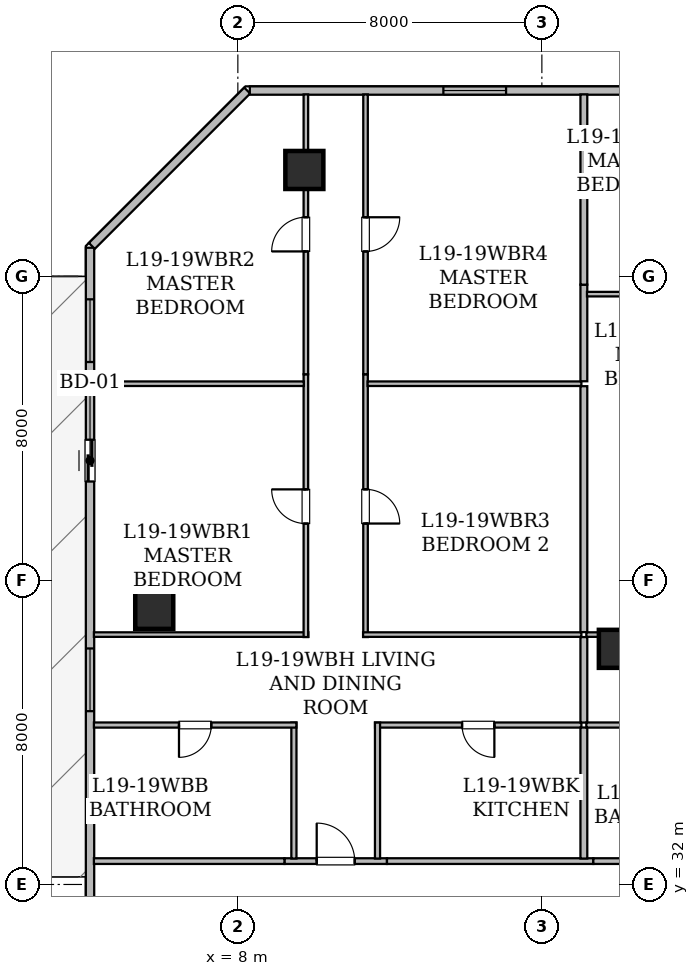
"""IFC4 building model, lengths in metres.
Left out: names, types, materials, properties, quantities, classifications, styles, units other than length and angle.
Written with IfcOpenShell. Run it as: python <this file> out.ifc"""

import sys

from ifc_helpers import new_model, si_unit, direction, frame, frame_2d, origin, origin_2d, place, context, subcontext, project, spatial, rectangle, hollow_rectangle, extrude, element, fill, save


model = new_model("IFC4")
c1 = context("Model", 3, precision=1e-05, world=origin(), true_north=direction((0.0, 1.0)))
c2 = subcontext(c1, "Body", "Model", "MODEL_VIEW")
j1 = project(units=[si_unit("LENGTHUNIT", "METRE"), si_unit("PLANEANGLEUNIT", "RADIAN")], contexts=[c1])
p1 = place(None, origin())
s1 = spatial("IfcSite", under=j1, at=p1, CompositionType="ELEMENT")
p2 = place(p1, origin())
s2 = spatial("IfcBuilding", under=s1, at=p2, CompositionType="ELEMENT")
p3 = place(p2, frame((0.0, 0.0, 77.1)))
s3 = spatial("IfcBuildingStorey", under=s2, at=p3, CompositionType="ELEMENT", Elevation=77.1)
for number, where, z_axis, x_axis in (
    (1, (9.75, 50.8, 0.0), (0.0, 0.0, 1.0), (1.0, 0.0, 0.0)),
    (2, (5.8, 39.225, 0.0), (0.0, 0.0, 1.0), (1.0, 0.0, 0.0)),
    (3, (18.0, 38.2, 0.0), (0.0, 0.0, 1.0), (1.0, 0.0, 0.0)),
):
    element("IfcColumn", number, at=place(p3, frame(where, z_axis=z_axis, x_axis=x_axis)), inside=s3, PredefinedType="COLUMN", context=c2, shape_type="SweptSolid", body=[
        extrude(hollow_rectangle(XDim=1.0, YDim=1.0, WallThickness=0.05, at=origin_2d()), origin(), (0.0, 0.0, 1.0), 3.65),
    ])
p4 = place(p3, frame((4.11, 31.295, 0.0), z_axis=(0.0, 0.0, 1.0), x_axis=(0.0, 1.0, 0.0)))
e4 = element("IfcWall", 4, at=p4, inside=s3, PredefinedType="STANDARD", context=c2, shape_type="SweptSolid", body=[
    extrude(rectangle(XDim=17.459, YDim=0.22, at=frame_2d((8.729, 0.0))), origin(), (0.0, 0.0, 1.0), 3.43),
])
p5 = place(p4, frame((11.308, 0.0, 0.0)))
e5 = element("IfcOpeningElement", 5, at=p5, cuts=e4, PredefinedType="OPENING", context=c2, shape_type="SweptSolid", body=[
    extrude(rectangle(XDim=1.1, YDim=2.2, at=frame_2d((0.55, 1.1))), frame((0.0, 0.12, 0.0), z_axis=(0.0, -1.0, 0.0), x_axis=(1.0, 0.0, 0.0)), (0.0, 0.0, 1.0), 0.24),
])
p6 = place(p4, frame((5.265, 0.0, 0.85)))
e6 = element("IfcOpeningElement", 6, at=p6, cuts=e4, PredefinedType="OPENING", context=c2, shape_type="SweptSolid", body=[
    extrude(rectangle(XDim=1.65, YDim=1.55, at=frame_2d((0.825, 0.775))), frame((0.0, 0.12, 0.0), z_axis=(0.0, -1.0, 0.0), x_axis=(1.0, 0.0, 0.0)), (0.0, 0.0, 1.0), 0.24),
])
p7 = place(p4, frame((14.452, 0.0, 0.85)))
e7 = element("IfcOpeningElement", 7, at=p7, cuts=e4, PredefinedType="OPENING", context=c2, shape_type="SweptSolid", body=[
    extrude(rectangle(XDim=1.65, YDim=1.55, at=frame_2d((0.825, 0.775))), frame((0.0, 0.12, 0.0), z_axis=(0.0, -1.0, 0.0), x_axis=(1.0, 0.0, 0.0)), (0.0, 0.0, 1.0), 0.24),
])
p8 = place(p3, frame((4.158, 48.802, 0.0), z_axis=(0.0, 0.0, 1.0), x_axis=(0.70712789547, 0.707085666273, 0.0)))
e8 = element("IfcWall", 8, at=p8, inside=s3, PredefinedType="STANDARD", context=c2, shape_type="SweptSolid", body=[
    extrude(rectangle(XDim=5.781, YDim=0.22, at=frame_2d((2.891, 0.0))), origin(), (0.0, 0.0, 1.0), 3.43),
])
p9 = place(p3, frame((8.315, 52.89, 0.0), z_axis=(0.0, 0.0, 1.0), x_axis=(1.0, 0.0, 0.0)))
e9 = element("IfcWall", 9, at=p9, inside=s3, PredefinedType="STANDARD", context=c2, shape_type="SweptSolid", body=[
    extrude(rectangle(XDim=37.439, YDim=0.22, at=frame_2d((18.719, 0.0))), origin(), (0.0, 0.0, 1.0), 3.43),
])
p10 = place(p9, frame((5.093, 0.0, 0.85)))
e10 = element("IfcOpeningElement", 10, at=p10, cuts=e9, PredefinedType="OPENING", context=c2, shape_type="SweptSolid", body=[
    extrude(rectangle(XDim=1.65, YDim=1.55, at=frame_2d((0.825, 0.775))), frame((0.0, 0.12, 0.0), z_axis=(0.0, -1.0, 0.0), x_axis=(1.0, 0.0, 0.0)), (0.0, 0.0, 1.0), 0.24),
])
p11 = place(p9, frame((13.055, 0.0, 0.8)))
e11 = element("IfcOpeningElement", 11, at=p11, cuts=e9, PredefinedType="OPENING", context=c2, shape_type="SweptSolid", body=[
    extrude(rectangle(XDim=1.2, YDim=1.5, at=frame_2d((0.6, 0.75))), frame((0.0, 0.12, 0.0), z_axis=(0.0, -1.0, 0.0), x_axis=(1.0, 0.0, 0.0)), (0.0, 0.0, 1.0), 0.24),
])
p12 = place(p9, frame((10.005, 0.0, 0.85)))
e12 = element("IfcOpeningElement", 12, at=p12, cuts=e9, PredefinedType="OPENING", context=c2, shape_type="SweptSolid", body=[
    extrude(rectangle(XDim=1.65, YDim=1.55, at=frame_2d((0.825, 0.775))), frame((0.0, 0.12, 0.0), z_axis=(0.0, -1.0, 0.0), x_axis=(1.0, 0.0, 0.0)), (0.0, 0.0, 1.0), 0.24),
])
p13 = place(p9, frame((15.655, 0.0, 0.85)))
e13 = element("IfcOpeningElement", 13, at=p13, cuts=e9, PredefinedType="OPENING", context=c2, shape_type="SweptSolid", body=[
    extrude(rectangle(XDim=1.65, YDim=1.55, at=frame_2d((0.825, 0.775))), frame((0.0, 0.12, 0.0), z_axis=(0.0, -1.0, 0.0), x_axis=(1.0, 0.0, 0.0)), (0.0, 0.0, 1.0), 0.24),
])
p14 = place(p9, frame((25.185, 0.0, 0.8)))
e14 = element("IfcOpeningElement", 14, at=p14, cuts=e9, PredefinedType="OPENING", context=c2, shape_type="SweptSolid", body=[
    extrude(rectangle(XDim=1.2, YDim=1.5, at=frame_2d((0.6, 0.75))), frame((0.0, 0.12, 0.0), z_axis=(0.0, -1.0, 0.0), x_axis=(1.0, 0.0, 0.0)), (0.0, 0.0, 1.0), 0.24),
])
p15 = place(p9, frame((20.935, 0.0, 0.85)))
e15 = element("IfcOpeningElement", 15, at=p15, cuts=e9, PredefinedType="OPENING", context=c2, shape_type="SweptSolid", body=[
    extrude(rectangle(XDim=1.65, YDim=1.55, at=frame_2d((0.825, 0.775))), frame((0.0, 0.12, 0.0), z_axis=(0.0, -1.0, 0.0), x_axis=(1.0, 0.0, 0.0)), (0.0, 0.0, 1.0), 0.24),
])
p16 = place(p9, frame((28.985, 0.0, 0.85)))
e16 = element("IfcOpeningElement", 16, at=p16, cuts=e9, PredefinedType="OPENING", context=c2, shape_type="SweptSolid", body=[
    extrude(rectangle(XDim=1.65, YDim=1.55, at=frame_2d((0.825, 0.775))), frame((0.0, 0.12, 0.0), z_axis=(0.0, -1.0, 0.0), x_axis=(1.0, 0.0, 0.0)), (0.0, 0.0, 1.0), 0.24),
])
p17 = place(p9, frame((33.98, 0.0, 0.85)))
e17 = element("IfcOpeningElement", 17, at=p17, cuts=e9, PredefinedType="OPENING", context=c2, shape_type="SweptSolid", body=[
    extrude(rectangle(XDim=1.65, YDim=1.55, at=frame_2d((0.825, 0.775))), frame((0.0, 0.12, 0.0), z_axis=(0.0, -1.0, 0.0), x_axis=(1.0, 0.0, 0.0)), (0.0, 0.0, 1.0), 0.24),
])
p18 = place(p3, frame((9.226, 32.615, 0.0), z_axis=(0.0, 0.0, 1.0), x_axis=(1.0, 0.0, 0.0)))
e18 = element("IfcWall", 18, at=p18, inside=s3, PredefinedType="STANDARD", context=c2, shape_type="SweptSolid", body=[
    extrude(rectangle(XDim=2.698, YDim=0.15, at=frame_2d((1.349, 0.0))), origin(), (0.0, 0.0, 1.0), 3.43),
])
p19 = place(p18, frame((0.849, 0.0, 0.0)))
e19 = element("IfcOpeningElement", 19, at=p19, cuts=e18, PredefinedType="OPENING", context=c2, shape_type="SweptSolid", body=[
    extrude(rectangle(XDim=1.0, YDim=2.15, at=frame_2d((0.5, 1.075))), frame((0.0, 0.085, 0.0), z_axis=(0.0, -1.0, 0.0), x_axis=(1.0, 0.0, 0.0)), (0.0, 0.0, 1.0), 0.17),
])
p20 = place(p3, frame((4.212, 32.615, 0.0), z_axis=(0.0, 0.0, 1.0), x_axis=(1.0, 0.0, 0.0)))
e20 = element("IfcWall", 20, at=p20, inside=s3, PredefinedType="STANDARD", context=c2, shape_type="SweptSolid", body=[
    extrude(rectangle(XDim=5.014, YDim=0.15, at=frame_2d((2.507, 0.0))), origin(), (0.0, 0.0, 1.0), 2.803),
])
p21 = place(p3, frame((11.924, 32.615, 0.0), z_axis=(0.0, 0.0, 1.0), x_axis=(1.0, 0.0, 0.0)))
e21 = element("IfcWall", 21, at=p21, inside=s3, PredefinedType="STANDARD", context=c2, shape_type="SweptSolid", body=[
    extrude(rectangle(XDim=5.43, YDim=0.15, at=frame_2d((2.715, 0.0))), origin(), (0.0, 0.0, 1.0), 3.43),
])
p22 = place(p3, frame((17.354, 32.615, 0.0), z_axis=(0.0, 0.0, 1.0), x_axis=(1.0, 0.0, 0.0)))
e22 = element("IfcWall", 22, at=p22, inside=s3, PredefinedType="STANDARD", context=c2, shape_type="SweptSolid", body=[
    extrude(rectangle(XDim=3.267, YDim=0.15, at=frame_2d((1.634, 0.0))), origin(), (0.0, 0.0, 1.0), 2.647),
])
p23 = place(p3, frame((9.475, 32.682, 0.0), z_axis=(0.0, 0.0, 1.0), x_axis=(0.0, 1.0, 0.0)))
e23 = element("IfcWall", 23, at=p23, inside=s3, PredefinedType="PARTITIONING", context=c2, shape_type="SweptSolid", body=[
    extrude(rectangle(XDim=3.578, YDim=0.135, at=frame_2d((1.789, 0.0))), origin(), (0.0, 0.0, 1.0), 3.43),
])
p24 = place(p3, frame((9.54, 36.195, 0.0), z_axis=(0.0, 0.0, 1.0), x_axis=(-1.0, 0.0, 0.0)))
e24 = element("IfcWall", 24, at=p24, inside=s3, PredefinedType="PARTITIONING", context=c2, shape_type="SweptSolid", body=[
    extrude(rectangle(XDim=5.328, YDim=0.135, at=frame_2d((2.664, 0.0))), origin(), (0.0, 0.0, 1.0), 2.803),
])
p25 = place(p24, frame((2.239, 0.0, 0.0)))
e25 = element("IfcOpeningElement", 25, at=p25, cuts=e24, PredefinedType="OPENING", context=c2, shape_type="SweptSolid", body=[
    extrude(rectangle(XDim=0.85, YDim=2.1, at=frame_2d((0.425, 1.05))), frame((0.0, 0.077, 0.0), z_axis=(0.0, -1.0, 0.0), x_axis=(1.0, 0.0, 0.0)), (0.0, 0.0, 1.0), 0.155),
])
p26 = place(p3, frame((17.04, 36.195, 0.0), z_axis=(0.0, 0.0, 1.0), x_axis=(-1.0, 0.0, 0.0)))
e26 = element("IfcWall", 26, at=p26, inside=s3, PredefinedType="PARTITIONING", context=c2, shape_type="SweptSolid", body=[
    extrude(rectangle(XDim=5.43, YDim=0.135, at=frame_2d((2.715, 0.0))), origin(), (0.0, 0.0, 1.0), 3.43),
])
p27 = place(p26, frame((2.29, 0.0, 0.0)))
e27 = element("IfcOpeningElement", 27, at=p27, cuts=e26, PredefinedType="OPENING", context=c2, shape_type="SweptSolid", body=[
    extrude(rectangle(XDim=0.85, YDim=2.1, at=frame_2d((0.425, 1.05))), frame((0.0, 0.077, 0.0), z_axis=(0.0, -1.0, 0.0), x_axis=(1.0, 0.0, 0.0)), (0.0, 0.0, 1.0), 0.155),
])
p28 = place(p3, frame((11.675, 36.26, 0.0), z_axis=(0.0, 0.0, 1.0), x_axis=(0.0, -1.0, 0.0)))
e28 = element("IfcWall", 28, at=p28, inside=s3, PredefinedType="PARTITIONING", context=c2, shape_type="SweptSolid", body=[
    extrude(rectangle(XDim=3.578, YDim=0.135, at=frame_2d((1.789, 0.0))), origin(), (0.0, 0.0, 1.0), 3.43),
])
p29 = place(p3, frame((4.212, 38.575, 0.0), z_axis=(0.0, 0.0, 1.0), x_axis=(1.0, 0.0, 0.0)))
e29 = element("IfcWall", 29, at=p29, inside=s3, PredefinedType="PARTITIONING", context=c2, shape_type="SweptSolid", body=[
    extrude(rectangle(XDim=5.643, YDim=0.12, at=frame_2d((2.822, 0.0))), origin(), (0.0, 0.0, 1.0), 2.647),
])
p30 = place(p3, frame((9.79, 38.51, 0.0), z_axis=(0.0, 0.0, 1.0), x_axis=(0.0, 1.0, 0.0)))
e30 = element("IfcWall", 30, at=p30, inside=s3, PredefinedType="PARTITIONING", context=c2, shape_type="SweptSolid", body=[
    extrude(rectangle(XDim=6.915, YDim=0.12, at=frame_2d((3.458, 0.0))), origin(), (0.0, 0.0, 1.0), 2.647),
])
p31 = place(p30, frame((2.986, 0.0, 0.0)))
e31 = element("IfcOpeningElement", 31, at=p31, cuts=e30, PredefinedType="OPENING", context=c2, shape_type="SweptSolid", body=[
    extrude(rectangle(XDim=0.9, YDim=2.1, at=frame_2d((0.45, 1.05))), frame((0.0, 0.07, 0.0), z_axis=(0.0, -1.0, 0.0), x_axis=(1.0, 0.0, 0.0)), (0.0, 0.0, 1.0), 0.14),
])
p32 = place(p3, frame((9.79, 45.425, 0.0), z_axis=(0.0, 0.0, 1.0), x_axis=(0.0, 1.0, 0.0)))
e32 = element("IfcWall", 32, at=p32, inside=s3, PredefinedType="PARTITIONING", context=c2, shape_type="SweptSolid", body=[
    extrude(rectangle(XDim=7.363, YDim=0.12, at=frame_2d((3.682, 0.0))), origin(), (0.0, 0.0, 1.0), 2.647),
])
p33 = place(p32, frame((3.232, 0.0, 0.0)))
e33 = element("IfcOpeningElement", 33, at=p33, cuts=e32, PredefinedType="OPENING", context=c2, shape_type="SweptSolid", body=[
    extrude(rectangle(XDim=0.9, YDim=2.1, at=frame_2d((0.45, 1.05))), frame((0.0, 0.07, 0.0), z_axis=(0.0, -1.0, 0.0), x_axis=(1.0, 0.0, 0.0)), (0.0, 0.0, 1.0), 0.14),
])
p34 = place(p3, frame((11.36, 45.425, 0.0), z_axis=(0.0, 0.0, 1.0), x_axis=(0.0, -1.0, 0.0)))
e34 = element("IfcWall", 34, at=p34, inside=s3, PredefinedType="PARTITIONING", context=c2, shape_type="SweptSolid", body=[
    extrude(rectangle(XDim=6.915, YDim=0.12, at=frame_2d((3.458, 0.0))), origin(), (0.0, 0.0, 1.0), 2.647),
])
p35 = place(p34, frame((3.028, 0.0, 0.0)))
e35 = element("IfcOpeningElement", 35, at=p35, cuts=e34, PredefinedType="OPENING", context=c2, shape_type="SweptSolid", body=[
    extrude(rectangle(XDim=0.9, YDim=2.1, at=frame_2d((0.45, 1.05))), frame((0.0, 0.07, 0.0), z_axis=(0.0, -1.0, 0.0), x_axis=(1.0, 0.0, 0.0)), (0.0, 0.0, 1.0), 0.14),
])
p36 = place(p3, frame((11.295, 38.575, 0.0), z_axis=(0.0, 0.0, 1.0), x_axis=(1.0, 0.0, 0.0)))
e36 = element("IfcWall", 36, at=p36, inside=s3, PredefinedType="PARTITIONING", context=c2, shape_type="SweptSolid", body=[
    extrude(rectangle(XDim=5.745, YDim=0.12, at=frame_2d((2.873, 0.0))), origin(), (0.0, 0.0, 1.0), 2.647),
])
p37 = place(p3, frame((11.36, 52.788, 0.0), z_axis=(0.0, 0.0, 1.0), x_axis=(0.0, -1.0, 0.0)))
e37 = element("IfcWall", 37, at=p37, inside=s3, PredefinedType="PARTITIONING", context=c2, shape_type="SweptSolid", body=[
    extrude(rectangle(XDim=7.363, YDim=0.12, at=frame_2d((3.682, 0.0))), origin(), (0.0, 0.0, 1.0), 2.647),
])
p38 = place(p37, frame((3.232, 0.0, 0.0)))
e38 = element("IfcOpeningElement", 38, at=p38, cuts=e37, PredefinedType="OPENING", context=c2, shape_type="SweptSolid", body=[
    extrude(rectangle(XDim=0.9, YDim=2.1, at=frame_2d((0.45, 1.05))), frame((0.0, 0.07, 0.0), z_axis=(0.0, -1.0, 0.0), x_axis=(1.0, 0.0, 0.0)), (0.0, 0.0, 1.0), 0.14),
])
p39 = place(p3, frame((17.105, 38.51, 0.0), z_axis=(0.0, 0.0, 1.0), x_axis=(0.0, -1.0, 0.0)))
e39 = element("IfcWall", 39, at=p39, inside=s3, PredefinedType="STANDARD", context=c2, shape_type="SweptSolid", body=[
    extrude(rectangle(XDim=2.25, YDim=0.18, at=frame_2d((1.125, 0.0))), origin(), (0.0, 0.0, 1.0), 2.647),
])
p40 = place(p3, frame((17.105, 36.13, 0.0), z_axis=(0.0, 0.0, 1.0), x_axis=(0.0, -1.0, 0.0)))
e40 = element("IfcWall", 40, at=p40, inside=s3, PredefinedType="STANDARD", context=c2, shape_type="SweptSolid", body=[
    extrude(rectangle(XDim=3.448, YDim=0.18, at=frame_2d((1.724, 0.0))), origin(), (0.0, 0.0, 1.0), 3.43),
])
p41 = place(p3, frame((4.212, 45.176, 0.0), z_axis=(0.0, 0.0, 1.0), x_axis=(1.0, 0.0, 0.0)))
e41 = element("IfcWall", 41, at=p41, inside=s3, PredefinedType="PARTITIONING", context=c2, shape_type="SweptSolid", body=[
    extrude(rectangle(XDim=5.524, YDim=0.12, at=frame_2d((2.762, 0.0))), origin(), (0.0, 0.0, 1.0), 2.803),
])
p42 = place(p3, frame((11.414, 45.176, 0.0), z_axis=(0.0, 0.0, 1.0), x_axis=(1.0, 0.0, 0.0)))
e42 = element("IfcWall", 42, at=p42, inside=s3, PredefinedType="PARTITIONING", context=c2, shape_type="SweptSolid", body=[
    extrude(rectangle(XDim=5.626, YDim=0.12, at=frame_2d((2.813, 0.0))), origin(), (0.0, 0.0, 1.0), 2.647),
])
p43 = place(p3, frame((17.105, 45.111, 0.0), z_axis=(0.0, 0.0, 1.0), x_axis=(0.0, -1.0, 0.0)))
e43 = element("IfcWall", 43, at=p43, inside=s3, PredefinedType="STANDARD", context=c2, shape_type="SweptSolid", body=[
    extrude(rectangle(XDim=6.471, YDim=0.18, at=frame_2d((3.236, 0.0))), origin(), (0.0, 0.0, 1.0), 2.647),
])
p44 = place(p3, frame((17.105, 47.782, 0.0), z_axis=(0.0, 0.0, 1.0), x_axis=(0.0, -1.0, 0.0)))
e44 = element("IfcWall", 44, at=p44, inside=s3, PredefinedType="STANDARD", context=c2, shape_type="SweptSolid", body=[
    extrude(rectangle(XDim=2.541, YDim=0.18, at=frame_2d((1.271, 0.0))), origin(), (0.0, 0.0, 1.0), 3.43),
])
p45 = place(p3, frame((17.105, 52.788, 0.0), z_axis=(0.0, 0.0, 1.0), x_axis=(0.0, -1.0, 0.0)))
e45 = element("IfcWall", 45, at=p45, inside=s3, PredefinedType="STANDARD", context=c2, shape_type="SweptSolid", body=[
    extrude(rectangle(XDim=5.006, YDim=0.18, at=frame_2d((2.503, 0.0))), origin(), (0.0, 0.0, 1.0), 2.803),
])
p46 = place(p3, frame((20.935, 36.195, 0.0), z_axis=(0.0, 0.0, 1.0), x_axis=(-1.0, 0.0, 0.0)))
e46 = element("IfcWall", 46, at=p46, inside=s3, PredefinedType="PARTITIONING", context=c2, shape_type="SweptSolid", body=[
    extrude(rectangle(XDim=3.765, YDim=0.135, at=frame_2d((1.883, 0.0))), origin(), (0.0, 0.0, 1.0), 2.647),
])
p47 = place(p46, frame((1.458, 0.0, 0.0)))
e47 = element("IfcOpeningElement", 47, at=p47, cuts=e46, PredefinedType="OPENING", context=c2, shape_type="SweptSolid", body=[
    extrude(rectangle(XDim=0.85, YDim=2.1, at=frame_2d((0.425, 1.05))), frame((0.0, 0.077, 0.0), z_axis=(0.0, -1.0, 0.0), x_axis=(1.0, 0.0, 0.0)), (0.0, 0.0, 1.0), 0.155),
])
p48 = place(p3, frame((17.17, 38.575, 0.0), z_axis=(0.0, 0.0, 1.0), x_axis=(1.0, 0.0, 0.0)))
e48 = element("IfcWall", 48, at=p48, inside=s3, PredefinedType="PARTITIONING", context=c2, shape_type="SweptSolid", body=[
    extrude(rectangle(XDim=4.08, YDim=0.12, at=frame_2d((2.04, 0.0))), origin(), (0.0, 0.0, 1.0), 2.647),
])
p49 = place(p3, frame((17.187, 47.533, 0.0), z_axis=(0.0, 0.0, 1.0), x_axis=(1.0, 0.0, 0.0)))
e49 = element("IfcWall", 49, at=p49, inside=s3, PredefinedType="PARTITIONING", context=c2, shape_type="SweptSolid", body=[
    extrude(rectangle(XDim=3.944, YDim=0.12, at=frame_2d((1.972, 0.0))), origin(), (0.0, 0.0, 1.0), 2.647),
])
p50 = place(p5, origin())
e50 = element("IfcDoor", 50, at=p50, inside=s3, OperationType="SLIDING_TO_LEFT", PredefinedType="DOOR", context=c2, shape_type="SweptSolid", body=[
    extrude(rectangle(XDim=1.1, YDim=2.2, at=frame_2d((0.55, 1.1))), frame((0.0, 0.025, 0.0), z_axis=(0.0, -1.0, 0.0), x_axis=(1.0, 0.0, 0.0)), (0.0, 0.0, 1.0), 0.05),
])
fill(e5, e50)
p51 = place(p6, origin())
e51 = element("IfcWindow", 51, at=p51, inside=s3, PartitioningType="SINGLE_PANEL", PredefinedType="WINDOW", context=c2, shape_type="SweptSolid", body=[
    extrude(rectangle(XDim=1.65, YDim=1.55, at=frame_2d((0.825, 0.775))), frame((0.0, 0.03, 0.0), z_axis=(0.0, -1.0, 0.0), x_axis=(1.0, 0.0, 0.0)), (0.0, 0.0, 1.0), 0.06),
])
fill(e6, e51)
p52 = place(p7, origin())
e52 = element("IfcWindow", 52, at=p52, inside=s3, PartitioningType="SINGLE_PANEL", PredefinedType="WINDOW", context=c2, shape_type="SweptSolid", body=[
    extrude(rectangle(XDim=1.65, YDim=1.55, at=frame_2d((0.825, 0.775))), frame((0.0, 0.03, 0.0), z_axis=(0.0, -1.0, 0.0), x_axis=(1.0, 0.0, 0.0)), (0.0, 0.0, 1.0), 0.06),
])
fill(e7, e52)
p53 = place(p10, origin())
e53 = element("IfcWindow", 53, at=p53, inside=s3, PartitioningType="SINGLE_PANEL", PredefinedType="WINDOW", context=c2, shape_type="SweptSolid", body=[
    extrude(rectangle(XDim=1.65, YDim=1.55, at=frame_2d((0.825, 0.775))), frame((0.0, 0.03, 0.0), z_axis=(0.0, -1.0, 0.0), x_axis=(1.0, 0.0, 0.0)), (0.0, 0.0, 1.0), 0.06),
])
fill(e10, e53)
p54 = place(p19, origin())
e54 = element("IfcDoor", 54, at=p54, inside=s3, OperationType="SINGLE_SWING_LEFT", PredefinedType="DOOR", context=c2, shape_type="SweptSolid", body=[
    extrude(rectangle(XDim=1.0, YDim=2.15, at=frame_2d((0.5, 1.075))), frame((0.0, 0.025, 0.0), z_axis=(0.0, -1.0, 0.0), x_axis=(1.0, 0.0, 0.0)), (0.0, 0.0, 1.0), 0.05),
])
fill(e19, e54)
p55 = place(p25, origin())
e55 = element("IfcDoor", 55, at=p55, inside=s3, OperationType="SINGLE_SWING_RIGHT", PredefinedType="DOOR", context=c2, shape_type="SweptSolid", body=[
    extrude(rectangle(XDim=0.85, YDim=2.1, at=frame_2d((0.425, 1.05))), frame((0.0, 0.025, 0.0), z_axis=(0.0, -1.0, 0.0), x_axis=(1.0, 0.0, 0.0)), (0.0, 0.0, 1.0), 0.05),
])
fill(e25, e55)
p56 = place(p27, origin())
e56 = element("IfcDoor", 56, at=p56, inside=s3, OperationType="SINGLE_SWING_LEFT", PredefinedType="DOOR", context=c2, shape_type="SweptSolid", body=[
    extrude(rectangle(XDim=0.85, YDim=2.1, at=frame_2d((0.425, 1.05))), frame((0.0, 0.025, 0.0), z_axis=(0.0, -1.0, 0.0), x_axis=(1.0, 0.0, 0.0)), (0.0, 0.0, 1.0), 0.05),
])
fill(e27, e56)
p57 = place(p31, origin())
e57 = element("IfcDoor", 57, at=p57, inside=s3, OperationType="SINGLE_SWING_RIGHT", PredefinedType="DOOR", context=c2, shape_type="SweptSolid", body=[
    extrude(rectangle(XDim=0.9, YDim=2.1, at=frame_2d((0.45, 1.05))), frame((0.0, 0.025, 0.0), z_axis=(0.0, -1.0, 0.0), x_axis=(1.0, 0.0, 0.0)), (0.0, 0.0, 1.0), 0.05),
])
fill(e31, e57)
p58 = place(p33, origin())
e58 = element("IfcDoor", 58, at=p58, inside=s3, OperationType="SINGLE_SWING_LEFT", PredefinedType="DOOR", context=c2, shape_type="SweptSolid", body=[
    extrude(rectangle(XDim=0.9, YDim=2.1, at=frame_2d((0.45, 1.05))), frame((0.0, 0.025, 0.0), z_axis=(0.0, -1.0, 0.0), x_axis=(1.0, 0.0, 0.0)), (0.0, 0.0, 1.0), 0.05),
])
fill(e33, e58)
p59 = place(p35, origin())
e59 = element("IfcDoor", 59, at=p59, inside=s3, OperationType="SINGLE_SWING_RIGHT", PredefinedType="DOOR", context=c2, shape_type="SweptSolid", body=[
    extrude(rectangle(XDim=0.9, YDim=2.1, at=frame_2d((0.45, 1.05))), frame((0.0, 0.025, 0.0), z_axis=(0.0, -1.0, 0.0), x_axis=(1.0, 0.0, 0.0)), (0.0, 0.0, 1.0), 0.05),
])
fill(e35, e59)
p60 = place(p38, origin())
e60 = element("IfcDoor", 60, at=p60, inside=s3, OperationType="SINGLE_SWING_LEFT", PredefinedType="DOOR", context=c2, shape_type="SweptSolid", body=[
    extrude(rectangle(XDim=0.9, YDim=2.1, at=frame_2d((0.45, 1.05))), frame((0.0, 0.025, 0.0), z_axis=(0.0, -1.0, 0.0), x_axis=(1.0, 0.0, 0.0)), (0.0, 0.0, 1.0), 0.05),
])
fill(e38, e60)
save(model, sys.argv[1])
